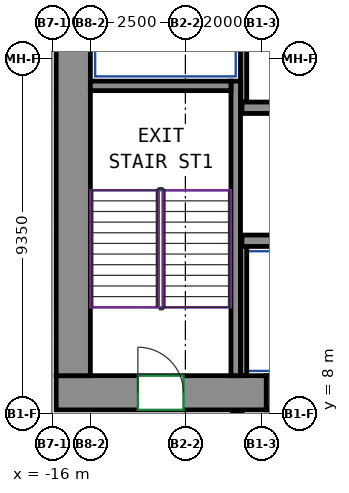
"""IFC4 building model, lengths in metres.
Left out: names, types, materials, properties, quantities, classifications, styles, units other than length and angle.
Written with IfcOpenShell. Run it as: python <this file> out.ifc"""

import sys

from ifc_helpers import new_model, si_unit, direction, frame, frame_2d, origin, place, context, subcontext, project, spatial, rectangle, extrude, source, transform, mapped, element, fill, save


model = new_model("IFC4")
c1 = context("Model", 3, precision=1e-05, world=origin(), true_north=direction((0.0, 1.0)))
c2 = subcontext(c1, "Body", "Model", "MODEL_VIEW")
j1 = project(units=[si_unit("LENGTHUNIT", "METRE"), si_unit("PLANEANGLEUNIT", "RADIAN")], contexts=[c1])
p1 = place(None, origin())
s1 = spatial("IfcSite", under=j1, at=p1, CompositionType="ELEMENT")
p2 = place(p1, origin())
s2 = spatial("IfcBuilding", under=s1, at=p2, CompositionType="ELEMENT")
p3 = place(p2, frame((0.0, 0.0, 112.6)))
s3 = spatial("IfcBuildingStorey", under=s2, at=p3, CompositionType="ELEMENT", Elevation=112.6)
m1 = source(origin(), c2, "Body", "SweptSolid", [
    extrude(rectangle(XDim=5.53, YDim=0.9, at=frame_2d((2.765, 0.0))), origin(), (0.0, 0.0, 1.0), 3.72),
])
p4 = place(p3, frame((-15.9, 8.55, 0.0), z_axis=(0.0, 0.0, 1.0), x_axis=(1.0, 0.0, 0.0)))
e1 = element("IfcWall", 1, at=p4, inside=s3, PredefinedType="SHEAR", context=c2, shape_type="MappedRepresentation", body=[
    mapped(m1, transform((0.0, 0.0, 0.0))),
])
p5 = place(p4, frame((2.15, 0.0, 0.0)))
e2 = element("IfcOpeningElement", 2, at=p5, cuts=e1, PredefinedType="OPENING", context=c2, shape_type="SweptSolid", body=[
    extrude(rectangle(XDim=1.2, YDim=2.1, at=frame_2d((0.6, 1.05))), frame((0.0, 0.46, 0.0), z_axis=(0.0, -1.0, 0.0), x_axis=(1.0, 0.0, 0.0)), (0.0, 0.0, 1.0), 0.92),
])
m2 = source(origin(), c2, "Body", "SweptSolid", [
    extrude(rectangle(XDim=12.0, YDim=0.9, at=frame_2d((6.0, 0.0))), origin(), (0.0, 0.0, 1.0), 3.72),
])
p6 = place(p3, frame((-15.45, 9.0, 0.0), z_axis=(0.0, 0.0, 1.0), x_axis=(0.0, 1.0, 0.0)))
e3 = element("IfcWall", 3, at=p6, inside=s3, PredefinedType="SHEAR", context=c2, shape_type="MappedRepresentation", body=[
    mapped(m2, transform((0.0, 0.0, 0.0))),
])
m3 = source(origin(), c2, "Body", "SweptSolid", [
    extrude(rectangle(XDim=7.75, YDim=0.25, at=frame_2d((3.875, 0.0))), origin(), (0.0, 0.0, 1.0), 3.72),
])
p7 = place(p3, frame((-11.175, 9.0, 0.0), z_axis=(0.0, 0.0, 1.0), x_axis=(0.0, 1.0, 0.0)))
e4 = element("IfcWall", 4, at=p7, inside=s3, PredefinedType="SHEAR", context=c2, shape_type="MappedRepresentation", body=[
    mapped(m3, transform((0.0, 0.0, 0.0))),
])
m4 = source(origin(), c2, "Body", "SweptSolid", [
    extrude(rectangle(XDim=3.7, YDim=0.25, at=frame_2d((1.85, 0.0))), origin(), (0.0, 0.0, 1.0), 3.72),
])
p8 = place(p3, frame((-15.0, 16.625, 0.0), z_axis=(0.0, 0.0, 1.0), x_axis=(1.0, 0.0, 0.0)))
e5 = element("IfcWall", 5, at=p8, inside=s3, PredefinedType="SHEAR", context=c2, shape_type="MappedRepresentation", body=[
    mapped(m4, transform((0.0, 0.0, 0.0))),
])
m5 = source(origin(), c2, "Body", "SweptSolid", [
    extrude(rectangle(XDim=6.0, YDim=0.3, at=frame_2d((3.0, 0.0))), origin(), (0.0, 0.0, 1.0), 3.72),
])
for number, where, z_axis, x_axis in (
    (6, (-11.01, 12.55, 0.0), (0.0, 0.0, 1.0), (1.0, 0.0, 0.0)),
    (7, (-11.01, 16.05, 0.0), (0.0, 0.0, 1.0), (1.0, 0.0, 0.0)),
):
    element("IfcWall", number, at=place(p3, frame(where, z_axis=z_axis, x_axis=x_axis)), inside=s3, PredefinedType="SHEAR", context=c2, shape_type="MappedRepresentation", body=[
        mapped(m5, transform((0.0, 0.0, 0.0))),
    ])
m6 = source(origin(), c2, "Body", "SweptSolid", [
    extrude(rectangle(XDim=4.8, YDim=0.165, at=frame_2d((2.4, 0.0))), origin(), (0.0, 0.0, 1.0), 3.72),
])
p9 = place(p3, frame((-10.968, 16.2, 0.0), z_axis=(0.0, 0.0, 1.0), x_axis=(0.0, 1.0, 0.0)))
e8 = element("IfcWall", 8, at=p9, inside=s3, PredefinedType="PARTITIONING", context=c2, shape_type="MappedRepresentation", body=[
    mapped(m6, transform((0.0, 0.0, 0.0))),
])
m7 = source(origin(), c2, "Body", "SweptSolid", [
    extrude(rectangle(XDim=3.4, YDim=0.165, at=frame_2d((1.7, 0.0))), origin(), (0.0, 0.0, 1.0), 3.72),
])
p10 = place(p3, frame((-10.968, 9.0, 0.0), z_axis=(0.0, 0.0, 1.0), x_axis=(0.0, 1.0, 0.0)))
e9 = element("IfcWall", 9, at=p10, inside=s3, PredefinedType="PARTITIONING", context=c2, shape_type="MappedRepresentation", body=[
    mapped(m7, transform((0.0, 0.0, 0.0))),
])
m8 = source(origin(), c2, "Body", "SweptSolid", [
    extrude(rectangle(XDim=1.4, YDim=0.9, at=frame_2d((0.7, 0.0))), origin(), (0.0, 0.0, 1.0), 2.7),
])
p11 = place(p3, frame((-10.37, 8.55, 0.0), z_axis=(0.0, 0.0, 1.0), x_axis=(1.0, 0.0, 0.0)))
e10 = element("IfcWall", 10, at=p11, inside=s3, PredefinedType="PARTITIONING", context=c2, shape_type="MappedRepresentation", body=[
    mapped(m8, transform((0.0, 0.0, 0.0))),
])
p12 = place(p11, frame((0.25, 0.0, 0.0)))
e11 = element("IfcOpeningElement", 11, at=p12, cuts=e10, PredefinedType="OPENING", context=c2, shape_type="SweptSolid", body=[
    extrude(rectangle(XDim=0.9, YDim=2.1, at=frame_2d((0.45, 1.05))), frame((0.0, 0.46, 0.0), z_axis=(0.0, -1.0, 0.0), x_axis=(1.0, 0.0, 0.0)), (0.0, 0.0, 1.0), 0.92),
])
p13 = place(p5, origin())
e12 = element("IfcDoor", 12, at=p13, inside=s3, OperationType="DOUBLE_DOOR_SINGLE_SWING", PredefinedType="DOOR", context=c2, shape_type="SweptSolid", body=[
    extrude(rectangle(XDim=1.2, YDim=2.1, at=frame_2d((0.6, 1.05))), frame((0.0, 0.355, 0.0), z_axis=(0.0, -1.0, 0.0), x_axis=(1.0, 0.0, 0.0)), (0.0, 0.0, 1.0), 0.05),
])
fill(e2, e12)
save(model, sys.argv[1])
